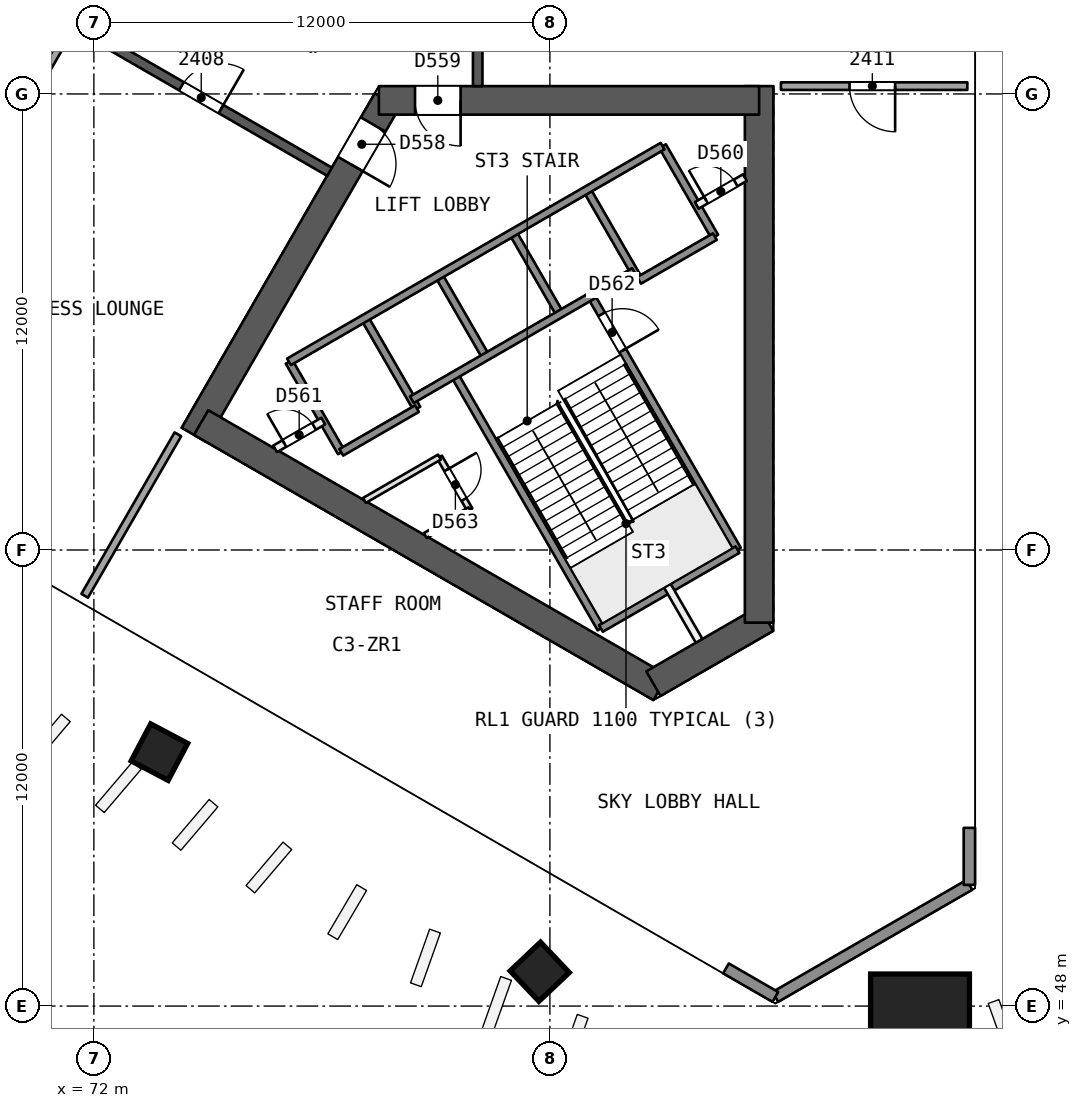
"""IFC4 building model, lengths in metres.
Left out: names, types, materials, properties, quantities, classifications, styles, units other than length and angle.
Written with IfcOpenShell. Run it as: python <this file> out.ifc"""

import sys

from ifc_helpers import new_model, si_unit, direction, frame, frame_2d, origin, origin_2d, place, context, subcontext, project, spatial, rectangle, extrude, element, fill, save


model = new_model("IFC4")
c1 = context("Model", 3, precision=1e-05, world=origin(), true_north=direction((0.0, 1.0)))
c2 = subcontext(c1, "Body", "Model", "MODEL_VIEW")
j1 = project(units=[si_unit("LENGTHUNIT", "METRE"), si_unit("PLANEANGLEUNIT", "RADIAN")], contexts=[c1])
p1 = place(None, origin())
s1 = spatial("IfcSite", under=j1, at=p1, CompositionType="ELEMENT")
p2 = place(p1, origin())
s2 = spatial("IfcBuilding", under=s1, at=p2, CompositionType="ELEMENT")
p3 = place(p2, frame((0.0, 0.0, 102.4)))
s3 = spatial("IfcBuildingStorey", under=s2, at=p3, CompositionType="ELEMENT", Elevation=102.4)
p4 = place(p3, frame((79.717, 71.831, 0.0), z_axis=(0.0, 0.0, 1.0), x_axis=(-0.499996230114, -0.866027580318, 0.0)))
e1 = element("IfcWall", 1, at=p4, inside=s3, PredefinedType="SHEAR", context=c2, shape_type="SweptSolid", body=[
    extrude(rectangle(XDim=10.164, YDim=0.75, at=frame_2d((5.082, 0.0))), origin(), (0.0, 0.0, 1.0), 4.4),
])
p5 = place(p4, frame((0.733, 0.0, 0.0)))
e2 = element("IfcOpeningElement", 2, at=p5, cuts=e1, PredefinedType="OPENING", context=c2, shape_type="SweptSolid", body=[
    extrude(rectangle(XDim=1.2, YDim=2.1, at=frame_2d((0.6, 1.05))), frame((0.0, 0.385, 0.0), z_axis=(0.0, -1.0, 0.0), x_axis=(1.0, 0.0, 0.0)), (0.0, 0.0, 1.0), 0.771),
])
p6 = place(p3, frame((74.822, 63.354, 0.0), z_axis=(0.0, 0.0, 1.0), x_axis=(0.8660248072, -0.500001033313, 0.0)))
e3 = element("IfcWall", 3, at=p6, inside=s3, PredefinedType="SHEAR", context=c2, shape_type="SweptSolid", body=[
    extrude(rectangle(XDim=13.958, YDim=0.75, at=frame_2d((6.979, 0.0))), origin(), (0.0, 0.0, 1.0), 4.4),
])
p7 = place(p3, frame((86.723, 56.483, 0.0), z_axis=(0.0, 0.0, 1.0), x_axis=(0.866017201164, 0.500014207086, 0.0)))
e4 = element("IfcWall", 4, at=p7, inside=s3, PredefinedType="SHEAR", context=c2, shape_type="SweptSolid", body=[
    extrude(rectangle(XDim=3.429, YDim=0.75, at=frame_2d((1.714, 0.0))), origin(), (0.0, 0.0, 1.0), 4.4),
])
p8 = place(p3, frame((89.505, 58.089, 0.0), z_axis=(0.0, 0.0, 1.0), x_axis=(0.0, 1.0, 0.0)))
e5 = element("IfcWall", 5, at=p8, inside=s3, PredefinedType="SHEAR", context=c2, shape_type="SweptSolid", body=[
    extrude(rectangle(XDim=14.117, YDim=0.75, at=frame_2d((7.059, 0.0))), origin(), (0.0, 0.0, 1.0), 4.4),
])
p9 = place(p3, frame((89.505, 71.831, 0.0), z_axis=(0.0, 0.0, 1.0), x_axis=(-1.0, 0.0, 0.0)))
e6 = element("IfcWall", 6, at=p9, inside=s3, PredefinedType="SHEAR", context=c2, shape_type="SweptSolid", body=[
    extrude(rectangle(XDim=10.005, YDim=0.75, at=frame_2d((5.002, 0.0))), origin(), (0.0, 0.0, 1.0), 4.4),
])
p10 = place(p9, frame((7.855, 0.0, 0.0)))
e7 = element("IfcOpeningElement", 7, at=p10, cuts=e6, PredefinedType="OPENING", context=c2, shape_type="SweptSolid", body=[
    extrude(rectangle(XDim=1.2, YDim=2.1, at=frame_2d((0.6, 1.05))), frame((0.0, 0.385, 0.0), z_axis=(0.0, -1.0, 0.0), x_axis=(1.0, 0.0, 0.0)), (0.0, 0.0, 1.0), 0.771),
])
p11 = place(p3, frame((82.1, 72.206, 0.0), z_axis=(0.0, 0.0, 1.0), x_axis=(0.0, 1.0, 0.0)))
e8 = element("IfcWall", 8, at=p11, inside=s3, PredefinedType="SHEAR", context=c2, shape_type="SweptSolid", body=[
    extrude(rectangle(XDim=15.588, YDim=0.25, at=frame_2d((7.794, 0.0))), origin(), (0.0, 0.0, 1.0), 3.95),
])
p12 = place(p11, frame((7.194, 0.0, 0.0)))
e9 = element("IfcOpeningElement", 9, at=p12, cuts=e8, PredefinedType="OPENING", context=c2, shape_type="SweptSolid", body=[
    extrude(rectangle(XDim=1.2, YDim=2.4, at=frame_2d((0.6, 1.2))), frame((0.0, 0.135, 0.0), z_axis=(0.0, -1.0, 0.0), x_axis=(1.0, 0.0, 0.0)), (0.0, 0.0, 1.0), 0.271),
])
p13 = place(p3, frame((64.7, 77.748, 0.0), z_axis=(0.0, 0.0, 1.0), x_axis=(0.866026492143, -0.499998114903, 0.0)))
e10 = element("IfcWall", 10, at=p13, inside=s3, PredefinedType="SHEAR", context=c2, shape_type="SweptSolid", body=[
    extrude(rectangle(XDim=15.588, YDim=0.25, at=frame_2d((7.794, 0.0))), origin(), (0.0, 0.0, 1.0), 3.95),
])
p14 = place(p13, frame((3.297, 0.0, 0.0)))
e11 = element("IfcOpeningElement", 11, at=p14, cuts=e10, PredefinedType="OPENING", context=c2, shape_type="SweptSolid", body=[
    extrude(rectangle(XDim=1.2, YDim=2.4, at=frame_2d((0.6, 1.2))), frame((0.0, 0.135, 0.0), z_axis=(0.0, -1.0, 0.0), x_axis=(1.0, 0.0, 0.0)), (0.0, 0.0, 1.0), 0.271),
])
p15 = place(p13, frame((11.091, 0.0, 0.0)))
e12 = element("IfcOpeningElement", 12, at=p15, cuts=e10, PredefinedType="OPENING", context=c2, shape_type="SweptSolid", body=[
    extrude(rectangle(XDim=1.2, YDim=2.4, at=frame_2d((0.6, 1.2))), frame((0.0, 0.135, 0.0), z_axis=(0.0, -1.0, 0.0), x_axis=(1.0, 0.0, 0.0)), (0.0, 0.0, 1.0), 0.271),
])
p16 = place(p3, frame((73.724, 54.654, 0.0), z_axis=(0.000887523446, 0.022798258525, 0.999739691975), x_axis=(-0.501112505118, -0.865146966245, 0.02017384471)))
e13 = element("IfcColumn", 13, at=p16, inside=s3, PredefinedType="COLUMN", context=c2, shape_type="SweptSolid", body=[
    extrude(rectangle(XDim=1.1, YDim=1.1, at=origin_2d()), origin(), (0.0, 0.0, 1.0), 4.401),
])
p17 = place(p3, frame((83.742, 48.87, 0.0), z_axis=(-0.008374576728, 0.028118611929, 0.999569512404), x_axis=(-0.499912450015, -0.865841081788, 0.020168376436)))
e14 = element("IfcColumn", 14, at=p17, inside=s3, PredefinedType="COLUMN", context=c2, shape_type="SweptSolid", body=[
    extrude(rectangle(XDim=1.1, YDim=1.1, at=origin_2d()), origin(), (0.0, 0.0, 1.0), 4.402),
])
p18 = place(p3, frame((93.76, 47.506, 0.0), z_axis=(-0.017633169529, 0.030497620254, 0.999379290606), x_axis=(0.500228551305, -0.865176492371, 0.035228305505)))
e15 = element("IfcColumn", 15, at=p18, inside=s3, PredefinedType="COLUMN", context=c2, shape_type="SweptSolid", body=[
    extrude(rectangle(XDim=2.6, YDim=2.6, at=origin_2d()), origin(), (0.0, 0.0, 1.0), 4.403),
])
p19 = place(p3, frame((94.984, 72.206, 0.0), z_axis=(0.0, 0.0, 1.0), x_axis=(-1.0, 0.0, 0.0)))
e16 = element("IfcWall", 16, at=p19, inside=s3, PredefinedType="PARTITIONING", context=c2, shape_type="SweptSolid", body=[
    extrude(rectangle(XDim=4.905, YDim=0.2, at=frame_2d((2.453, 0.0))), origin(), (0.0, 0.0, 1.0), 3.95),
])
p20 = place(p19, frame((1.9, 0.0, 0.0)))
e17 = element("IfcOpeningElement", 17, at=p20, cuts=e16, PredefinedType="OPENING", context=c2, shape_type="SweptSolid", body=[
    extrude(rectangle(XDim=1.2, YDim=2.4, at=frame_2d((0.6, 1.2))), frame((0.0, 0.11, 0.0), z_axis=(0.0, -1.0, 0.0), x_axis=(1.0, 0.0, 0.0)), (0.0, 0.0, 1.0), 0.221),
])
p21 = place(p3, frame((65.008, 62.693, 0.0), z_axis=(0.0, 0.0, 1.0), x_axis=(0.499996920331, 0.866027181825, 0.0)))
e18 = element("IfcWall", 18, at=p21, inside=s3, PredefinedType="PARTITIONING", context=c2, shape_type="SweptSolid", body=[
    extrude(rectangle(XDim=12.884, YDim=0.2, at=frame_2d((6.442, 0.0))), origin(), (0.0, 0.0, 1.0), 3.95),
])
p22 = place(p3, frame((74.21, 63.044, 0.0), z_axis=(0.0, 0.0, 1.0), x_axis=(-0.499982380289, -0.86603557629, 0.0)))
e19 = element("IfcWall", 19, at=p22, inside=s3, PredefinedType="PARTITIONING", context=c2, shape_type="SweptSolid", body=[
    extrude(rectangle(XDim=4.906, YDim=0.2, at=frame_2d((2.453, 0.0))), origin(), (0.0, 0.0, 1.0), 3.95),
])
p23 = place(p3, frame((95.038, 51.189, 0.0), z_axis=(0.0, 0.0, 1.0), x_axis=(-0.86603043987, -0.499991277142, 0.0)))
e20 = element("IfcWall", 20, at=p23, inside=s3, PredefinedType="SOLIDWALL", context=c2, shape_type="SweptSolid", body=[
    extrude(rectangle(XDim=5.896, YDim=0.3, at=frame_2d((2.948, 0.0))), origin(), (0.0, 0.0, 1.0), 3.95),
])
for number, where, z_axis, x_axis in (
    (21, (95.038, 52.689, 0.0), (0.0, 0.0, 1.0), (0.0, -1.0, 0.0)),
    (22, (89.932, 48.241, 0.0), (0.0, 0.0, 1.0), (-0.866, 0.5, 0.0)),
):
    element("IfcWall", number, at=place(p3, frame(where, z_axis=z_axis, x_axis=x_axis)), inside=s3, PredefinedType="SOLIDWALL", context=c2, shape_type="SweptSolid", body=[
        extrude(rectangle(XDim=1.5, YDim=0.3, at=frame_2d((0.75, 0.0))), origin(), (0.0, 0.0, 1.0), 3.95),
    ])
p24 = place(p3, frame((77.135, 64.952, 0.0), z_axis=(0.0, 0.0, 1.0), x_axis=(0.499996545922, -0.866027397988, 0.0)))
e23 = element("IfcWall", 23, at=p24, inside=s3, PredefinedType="SOLIDWALL", context=c2, shape_type="SweptSolid", body=[
    extrude(rectangle(XDim=2.75, YDim=0.2, at=frame_2d((1.375, 0.0))), origin(), (0.0, 0.0, 1.0), 3.95),
])
p25 = place(p3, frame((81.094, 62.445, 0.0), z_axis=(0.0, 0.0, 1.0), x_axis=(0.499880961361, -0.866094119867, 0.0)))
e24 = element("IfcWall", 24, at=p25, inside=s3, PredefinedType="PARTITIONING", context=c2, shape_type="SweptSolid", body=[
    extrude(rectangle(XDim=1.6, YDim=0.15, at=frame_2d((0.8, 0.0))), origin(), (0.0, 0.0, 1.0), 3.95),
])
p26 = place(p25, frame((0.387, 0.0, 0.0)))
e25 = element("IfcOpeningElement", 25, at=p26, cuts=e24, PredefinedType="OPENING", context=c2, shape_type="SweptSolid", body=[
    extrude(rectangle(XDim=0.9, YDim=2.1, at=frame_2d((0.45, 1.05))), frame((0.0, 0.085, 0.0), z_axis=(0.0, -1.0, 0.0), x_axis=(1.0, 0.0, 0.0)), (0.0, 0.0, 1.0), 0.171),
])
p27 = place(p3, frame((79.127, 66.102, 0.0), z_axis=(0.0, 0.0, 1.0), x_axis=(0.499996545922, -0.866027397988, 0.0)))
e26 = element("IfcWall", 26, at=p27, inside=s3, PredefinedType="SOLIDWALL", context=c2, shape_type="SweptSolid", body=[
    extrude(rectangle(XDim=2.75, YDim=0.2, at=frame_2d((1.375, 0.0))), origin(), (0.0, 0.0, 1.0), 3.95),
])
p28 = place(p3, frame((81.493, 64.604, 0.0), z_axis=(0.0, 0.0, 1.0), x_axis=(0.500006057782, -0.866021906294, 0.0)))
e27 = element("IfcWall", 27, at=p28, inside=s3, PredefinedType="SOLIDWALL", context=c2, shape_type="SweptSolid", body=[
    extrude(rectangle(XDim=7.7, YDim=0.2, at=frame_2d((3.85, 0.0))), origin(), (0.0, 0.0, 1.0), 3.95),
])
p29 = place(p3, frame((81.076, 67.227, 0.0), z_axis=(0.0, 0.0, 1.0), x_axis=(0.50000366821, -0.866023285932, 0.0)))
e28 = element("IfcWall", 28, at=p29, inside=s3, PredefinedType="SOLIDWALL", context=c2, shape_type="SweptSolid", body=[
    extrude(rectangle(XDim=2.48, YDim=0.2, at=frame_2d((1.24, 0.0))), origin(), (0.0, 0.0, 1.0), 3.95),
])
p30 = place(p3, frame((87.09, 59.06, 0.0), z_axis=(0.0, 0.0, 1.0), x_axis=(0.499937194881, -0.866061661301, 0.0)))
e29 = element("IfcWall", 29, at=p30, inside=s3, PredefinedType="PARTITIONING", context=c2, shape_type="SweptSolid", body=[
    extrude(rectangle(XDim=1.673, YDim=0.2, at=frame_2d((0.836, 0.0))), origin(), (0.0, 0.0, 1.0), 3.95),
])
p31 = place(p3, frame((83.024, 68.352, 0.0), z_axis=(0.0, 0.0, 1.0), x_axis=(0.50000366821, -0.866023285932, 0.0)))
e30 = element("IfcWall", 30, at=p31, inside=s3, PredefinedType="SOLIDWALL", context=c2, shape_type="SweptSolid", body=[
    extrude(rectangle(XDim=2.48, YDim=0.2, at=frame_2d((1.24, 0.0))), origin(), (0.0, 0.0, 1.0), 3.95),
])
p32 = place(p3, frame((85.087, 66.679, 0.0), z_axis=(0.0, 0.0, 1.0), x_axis=(0.500019787375, -0.866013979237, 0.0)))
e31 = element("IfcWall", 31, at=p32, inside=s3, PredefinedType="SOLIDWALL", context=c2, shape_type="SweptSolid", body=[
    extrude(rectangle(XDim=7.7, YDim=0.2, at=frame_2d((3.85, 0.0))), origin(), (0.0, 0.0, 1.0), 3.95),
])
p33 = place(p32, frame((0.55, 0.0, 0.0)))
e32 = element("IfcOpeningElement", 32, at=p33, cuts=e31, PredefinedType="OPENING", context=c2, shape_type="SweptSolid", body=[
    extrude(rectangle(XDim=1.1, YDim=2.1, at=frame_2d((0.55, 1.05))), frame((0.0, 0.11, 0.0), z_axis=(0.0, -1.0, 0.0), x_axis=(1.0, 0.0, 0.0)), (0.0, 0.0, 1.0), 0.221),
])
for number, where, z_axis, x_axis in (
    (33, (84.973, 69.477, 0.0), (0.0, 0.0, 1.0), (0.5, -0.866, 0.0)),
    (34, (86.965, 70.626, 0.0), (0.0, 0.0, 1.0), (0.5, -0.866, 0.0)),
):
    element("IfcWall", number, at=place(p3, frame(where, z_axis=z_axis, x_axis=x_axis)), inside=s3, PredefinedType="SOLIDWALL", context=c2, shape_type="SweptSolid", body=[
        extrude(rectangle(XDim=2.75, YDim=0.2, at=frame_2d((1.375, 0.0))), origin(), (0.0, 0.0, 1.0), 3.95),
    ])
p34 = place(p3, frame((77.135, 64.952, 0.0), z_axis=(0.0, 0.0, 1.0), x_axis=(0.866031916153, 0.499988720078, 0.0)))
e35 = element("IfcWall", 35, at=p34, inside=s3, PredefinedType="SOLIDWALL", context=c2, shape_type="SweptSolid", body=[
    extrude(rectangle(XDim=11.35, YDim=0.2, at=frame_2d((5.675, 0.0))), origin(), (0.0, 0.0, 1.0), 3.95),
])
p35 = place(p3, frame((76.77, 62.662, 0.0), z_axis=(0.0, 0.0, 1.0), x_axis=(0.866054810376, 0.49994906283, 0.0)))
e36 = element("IfcWall", 36, at=p35, inside=s3, PredefinedType="PARTITIONING", context=c2, shape_type="SweptSolid", body=[
    extrude(rectangle(XDim=1.461, YDim=0.2, at=frame_2d((0.73, 0.0))), origin(), (0.0, 0.0, 1.0), 3.95),
])
p36 = place(p35, frame((0.281, 0.0, 0.0)))
e37 = element("IfcOpeningElement", 37, at=p36, cuts=e36, PredefinedType="OPENING", context=c2, shape_type="SweptSolid", body=[
    extrude(rectangle(XDim=0.9, YDim=2.1, at=frame_2d((0.45, 1.05))), frame((0.0, 0.11, 0.0), z_axis=(0.0, -1.0, 0.0), x_axis=(1.0, 0.0, 0.0)), (0.0, 0.0, 1.0), 0.221),
])
p37 = place(p3, frame((87.865, 69.068, 0.0), z_axis=(0.0, 0.0, 1.0), x_axis=(0.865982457891, 0.500074377092, 0.0)))
e38 = element("IfcWall", 38, at=p37, inside=s3, PredefinedType="PARTITIONING", context=c2, shape_type="SweptSolid", body=[
    extrude(rectangle(XDim=1.461, YDim=0.2, at=frame_2d((0.73, 0.0))), origin(), (0.0, 0.0, 1.0), 3.95),
])
p38 = place(p37, frame((0.281, 0.0, 0.0)))
e39 = element("IfcOpeningElement", 39, at=p38, cuts=e38, PredefinedType="OPENING", context=c2, shape_type="SweptSolid", body=[
    extrude(rectangle(XDim=0.9, YDim=2.1, at=frame_2d((0.45, 1.05))), frame((0.0, 0.11, 0.0), z_axis=(0.0, -1.0, 0.0), x_axis=(1.0, 0.0, 0.0)), (0.0, 0.0, 1.0), 0.221),
])
p39 = place(p3, frame((80.367, 63.954, 0.0), z_axis=(0.0, 0.0, 1.0), x_axis=(0.866026575979, 0.499997969693, 0.0)))
e40 = element("IfcWall", 40, at=p39, inside=s3, PredefinedType="SOLIDWALL", context=c2, shape_type="SweptSolid", body=[
    extrude(rectangle(XDim=6.75, YDim=0.2, at=frame_2d((3.375, 0.0))), origin(), (0.0, 0.0, 1.0), 3.95),
])
p40 = place(p3, frame((78.51, 62.57, 0.0), z_axis=(0.0, 0.0, 1.0), x_axis=(0.866053019151, 0.499952165731, 0.0)))
e41 = element("IfcWall", 41, at=p40, inside=s3, PredefinedType="SOLIDWALL", context=c2, shape_type="SweptSolid", body=[
    extrude(rectangle(XDim=2.3, YDim=0.2, at=frame_2d((1.15, 0.0))), origin(), (0.0, 0.0, 1.0), 3.95),
])
p41 = place(p3, frame((86.348, 67.095, 0.0), z_axis=(0.0, 0.0, 1.0), x_axis=(0.86602648383, 0.499998129301, 0.0)))
e42 = element("IfcWall", 42, at=p41, inside=s3, PredefinedType="SOLIDWALL", context=c2, shape_type="SweptSolid", body=[
    extrude(rectangle(XDim=2.3, YDim=0.2, at=frame_2d((1.15, 0.0))), origin(), (0.0, 0.0, 1.0), 3.95),
])
p42 = place(p3, frame((79.12, 61.305, 0.0), z_axis=(0.0, 0.0, 1.0), x_axis=(0.866046471269, 0.499963508271, 0.0)))
e43 = element("IfcWall", 43, at=p42, inside=s3, PredefinedType="PARTITIONING", context=c2, shape_type="SweptSolid", body=[
    extrude(rectangle(XDim=2.28, YDim=0.15, at=frame_2d((1.14, 0.0))), origin(), (0.0, 0.0, 1.0), 3.95),
])
p43 = place(p3, frame((80.72, 60.382, 0.0), z_axis=(0.0, 0.0, 1.0), x_axis=(0.866017611601, 0.500013496215, 0.0)))
e44 = element("IfcWall", 44, at=p43, inside=s3, PredefinedType="PARTITIONING", context=c2, shape_type="SweptSolid", body=[
    extrude(rectangle(XDim=1.355, YDim=0.15, at=frame_2d((0.678, 0.0))), origin(), (0.0, 0.0, 1.0), 3.95),
])
p44 = place(p3, frame((85.343, 57.935, 0.0), z_axis=(0.0, 0.0, 1.0), x_axis=(0.866004344652, 0.500036473714, 0.0)))
e45 = element("IfcWall", 45, at=p44, inside=s3, PredefinedType="SOLIDWALL", context=c2, shape_type="SweptSolid", body=[
    extrude(rectangle(XDim=4.15, YDim=0.2, at=frame_2d((2.075, 0.0))), origin(), (0.0, 0.0, 1.0), 3.95),
])
p45 = place(p15, origin())
e46 = element("IfcDoor", 46, at=p45, inside=s3, OperationType="SINGLE_SWING_RIGHT", PredefinedType="NOTDEFINED", context=c2, shape_type="SweptSolid", body=[
    extrude(rectangle(XDim=1.2, YDim=2.4, at=frame_2d((0.6, 1.2))), frame((0.0, 0.025, 0.0), z_axis=(0.0, -1.0, 0.0), x_axis=(1.0, 0.0, 0.0)), (0.0, 0.0, 1.0), 0.05),
])
fill(e12, e46)
p46 = place(p20, origin())
e47 = element("IfcDoor", 47, at=p46, inside=s3, OperationType="SINGLE_SWING_LEFT", PredefinedType="NOTDEFINED", context=c2, shape_type="SweptSolid", body=[
    extrude(rectangle(XDim=1.2, YDim=2.4, at=frame_2d((0.6, 1.2))), frame((0.0, 0.025, 0.0), z_axis=(0.0, -1.0, 0.0), x_axis=(1.0, 0.0, 0.0)), (0.0, 0.0, 1.0), 0.05),
])
fill(e17, e47)
p47 = place(p5, origin())
e48 = element("IfcDoor", 48, at=p47, inside=s3, OperationType="SINGLE_SWING_RIGHT", PredefinedType="NOTDEFINED", context=c2, shape_type="SweptSolid", body=[
    extrude(rectangle(XDim=1.2, YDim=2.1, at=frame_2d((0.6, 1.05))), frame((0.0, 0.025, 0.0), z_axis=(0.0, -1.0, 0.0), x_axis=(1.0, 0.0, 0.0)), (0.0, 0.0, 1.0), 0.05),
])
fill(e2, e48)
p48 = place(p10, origin())
e49 = element("IfcDoor", 49, at=p48, inside=s3, OperationType="SINGLE_SWING_LEFT", PredefinedType="NOTDEFINED", context=c2, shape_type="SweptSolid", body=[
    extrude(rectangle(XDim=1.2, YDim=2.1, at=frame_2d((0.6, 1.05))), frame((0.0, 0.025, 0.0), z_axis=(0.0, -1.0, 0.0), x_axis=(1.0, 0.0, 0.0)), (0.0, 0.0, 1.0), 0.05),
])
fill(e7, e49)
p49 = place(p38, origin())
e50 = element("IfcDoor", 50, at=p49, inside=s3, OperationType="SINGLE_SWING_LEFT", PredefinedType="NOTDEFINED", context=c2, shape_type="SweptSolid", body=[
    extrude(rectangle(XDim=0.9, YDim=2.1, at=frame_2d((0.45, 1.05))), frame((0.0, 0.025, 0.0), z_axis=(0.0, -1.0, 0.0), x_axis=(1.0, 0.0, 0.0)), (0.0, 0.0, 1.0), 0.05),
])
fill(e39, e50)
p50 = place(p36, origin())
e51 = element("IfcDoor", 51, at=p50, inside=s3, OperationType="SINGLE_SWING_LEFT", PredefinedType="NOTDEFINED", context=c2, shape_type="SweptSolid", body=[
    extrude(rectangle(XDim=0.9, YDim=2.1, at=frame_2d((0.45, 1.05))), frame((0.0, 0.025, 0.0), z_axis=(0.0, -1.0, 0.0), x_axis=(1.0, 0.0, 0.0)), (0.0, 0.0, 1.0), 0.05),
])
fill(e37, e51)
p51 = place(p33, origin())
e52 = element("IfcDoor", 52, at=p51, inside=s3, OperationType="SINGLE_SWING_RIGHT", PredefinedType="NOTDEFINED", context=c2, shape_type="SweptSolid", body=[
    extrude(rectangle(XDim=1.1, YDim=2.1, at=frame_2d((0.55, 1.05))), frame((0.0, 0.025, 0.0), z_axis=(0.0, -1.0, 0.0), x_axis=(1.0, 0.0, 0.0)), (0.0, 0.0, 1.0), 0.05),
])
fill(e32, e52)
p52 = place(p26, origin())
e53 = element("IfcDoor", 53, at=p52, inside=s3, OperationType="SINGLE_SWING_LEFT", PredefinedType="NOTDEFINED", context=c2, shape_type="SweptSolid", body=[
    extrude(rectangle(XDim=0.9, YDim=2.1, at=frame_2d((0.45, 1.05))), frame((0.0, 0.025, 0.0), z_axis=(0.0, -1.0, 0.0), x_axis=(1.0, 0.0, 0.0)), (0.0, 0.0, 1.0), 0.05),
])
fill(e25, e53)
save(model, sys.argv[1])
